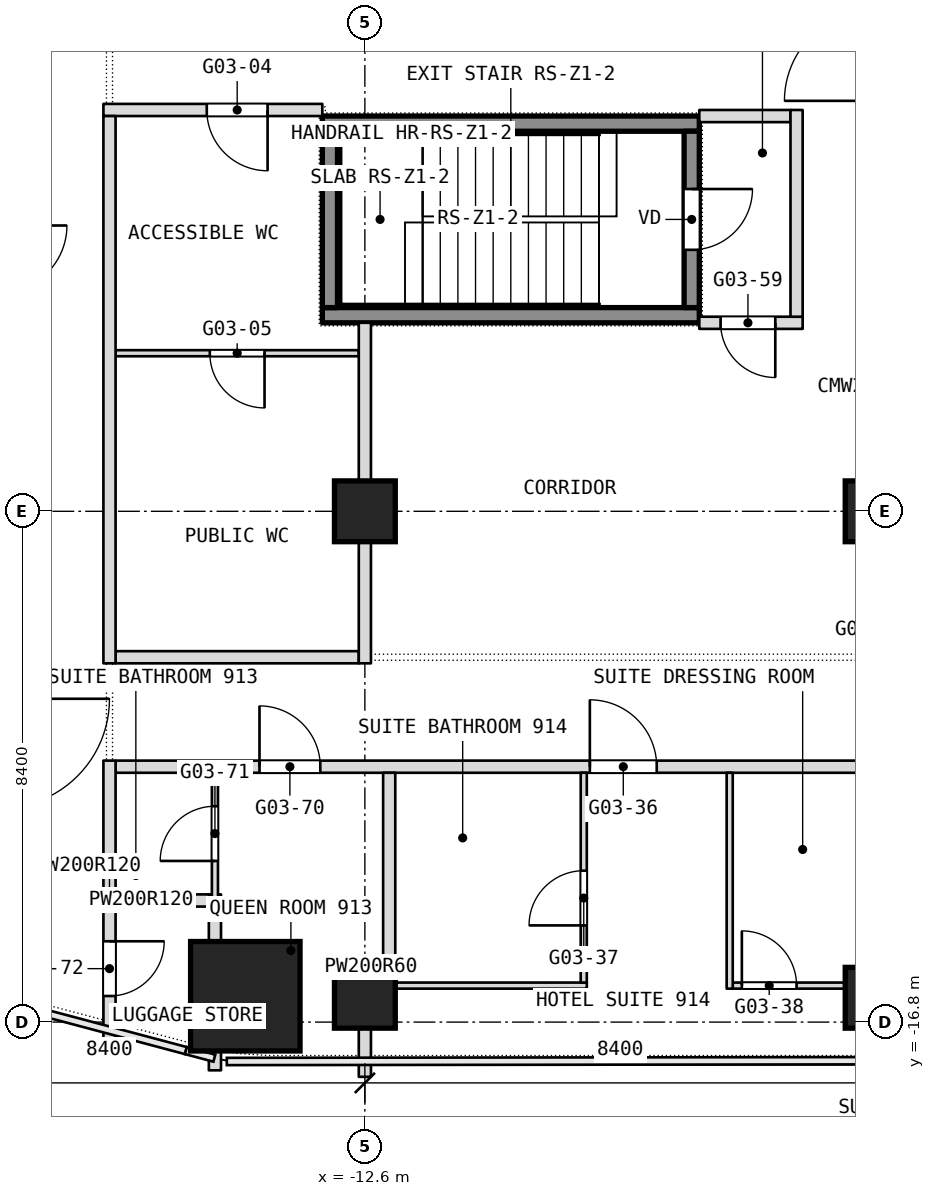
"""IFC4 building model, lengths in metres.
Left out: names, types, materials, properties, quantities, classifications, styles, units other than length and angle.
Written with IfcOpenShell. Run it as: python <this file> out.ifc"""

import sys

from ifc_helpers import new_model, si_unit, direction, frame, frame_2d, origin, origin_2d, place, context, subcontext, project, spatial, rectangle, extrude, element, fill, save


model = new_model("IFC4")
c1 = context("Model", 3, precision=1e-05, world=origin(), true_north=direction((0.0, 1.0)))
c2 = subcontext(c1, "Body", "Model", "MODEL_VIEW")
j1 = project(units=[si_unit("LENGTHUNIT", "METRE"), si_unit("PLANEANGLEUNIT", "RADIAN")], contexts=[c1])
p1 = place(None, origin())
s1 = spatial("IfcSite", under=j1, at=p1, CompositionType="ELEMENT")
p2 = place(p1, origin())
s2 = spatial("IfcBuilding", under=s1, at=p2, CompositionType="ELEMENT")
p3 = place(p2, frame((0.0, 0.0, 47.3)))
s3 = spatial("IfcBuildingStorey", under=s2, at=p3, CompositionType="ELEMENT", Elevation=47.3)
p4 = place(p3, frame((-14.566, -16.375, 0.0), z_axis=(0.0, 0.0, 1.0), x_axis=(1.0, 0.0, 0.0)))
e1 = element("IfcColumn", 1, at=p4, inside=s3, PredefinedType="COLUMN", context=c2, shape_type="SweptSolid", body=[
    extrude(rectangle(XDim=1.8, YDim=1.8, at=origin_2d()), origin(), (0.0, 0.0, 1.0), 3.6),
])
for number, where, z_axis, x_axis in (
    (2, (-12.6, -8.4, 0.0), (0.0, 0.0, 1.0), (1.0, 0.0, 0.0)),
    (3, (-4.2, -8.4, 0.0), (0.0, 0.0, 1.0), (1.0, 0.0, 0.0)),
    (4, (-4.2, -16.4, 0.0), (0.0, 0.0, 1.0), (1.0, 0.0, 0.0)),
    (5, (-12.6, -16.4, 0.0), (0.0, 0.0, 1.0), (1.0, 0.0, 0.0)),
):
    element("IfcColumn", number, at=place(p3, frame(where, z_axis=z_axis, x_axis=x_axis)), inside=s3, PredefinedType="COLUMN", context=c2, shape_type="SweptSolid", body=[
        extrude(rectangle(XDim=1.0, YDim=1.0, at=origin_2d()), origin(), (0.0, 0.0, 1.0), 3.6),
    ])
p5 = place(p3, frame((-12.5, -16.2, 0.0), z_axis=(0.0, 0.0, 1.0), x_axis=(1.0, 0.0, 0.0)))
e6 = element("IfcWall", 6, at=p5, inside=s3, PredefinedType="PARTITIONING", context=c2, shape_type="SweptSolid", body=[
    extrude(rectangle(XDim=3.55, YDim=0.1, at=frame_2d((1.775, 0.0))), origin(), (0.0, 0.0, 1.0), 2.94),
])
p6 = place(p3, frame((-6.55, -16.2, 0.0), z_axis=(0.0, 0.0, 1.0), x_axis=(1.0, 0.0, 0.0)))
e7 = element("IfcWall", 7, at=p6, inside=s3, PredefinedType="PARTITIONING", context=c2, shape_type="SweptSolid", body=[
    extrude(rectangle(XDim=4.8, YDim=0.1, at=frame_2d((2.4, 0.0))), origin(), (0.0, 0.0, 1.0), 2.94),
])
p7 = place(p6, frame((0.15, 0.0, 0.0)))
e8 = element("IfcOpeningElement", 8, at=p7, cuts=e7, PredefinedType="OPENING", context=c2, shape_type="SweptSolid", body=[
    extrude(rectangle(XDim=0.9, YDim=2.1, at=frame_2d((0.45, 1.05))), frame((0.0, 0.05, 0.0), z_axis=(0.0, -1.0, 0.0), x_axis=(1.0, 0.0, 0.0)), (0.0, 0.0, 1.0), 0.1),
])
p8 = place(p6, frame((3.75, 0.0, 0.0)))
e9 = element("IfcOpeningElement", 9, at=p8, cuts=e7, PredefinedType="OPENING", context=c2, shape_type="SweptSolid", body=[
    extrude(rectangle(XDim=0.9, YDim=2.1, at=frame_2d((0.45, 1.05))), frame((0.0, 0.05, 0.0), z_axis=(0.0, -1.0, 0.0), x_axis=(1.0, 0.0, 0.0)), (0.0, 0.0, 1.0), 0.1),
])
p9 = place(p3, frame((-12.7, -15.9, 0.0), z_axis=(0.0, 0.0, 1.0), x_axis=(1.0, 0.0, 0.0)))
e10 = element("IfcWall", 10, at=p9, inside=s3, PredefinedType="PARTITIONING", context=c2, shape_type="SweptSolid", body=[
    extrude(rectangle(XDim=0.4, YDim=0.2, at=frame_2d((0.2, 0.0))), origin(), (0.0, 0.0, 1.0), 3.34),
])
p10 = place(p3, frame((-16.7, -14.8, 0.0), z_axis=(0.0, 0.0, 1.0), x_axis=(1.0, 0.0, 0.0)))
e11 = element("IfcWall", 11, at=p10, inside=s3, PredefinedType="PARTITIONING", context=c2, shape_type="SweptSolid", body=[
    extrude(rectangle(XDim=1.584, YDim=0.2, at=frame_2d((0.792, 0.0))), origin(), (0.0, 0.0, 1.0), 3.34),
])
p11 = place(p3, frame((-16.7, -12.6, 0.0), z_axis=(0.0, 0.0, 1.0), x_axis=(1.0, 0.0, 0.0)))
e12 = element("IfcWall", 12, at=p11, inside=s3, PredefinedType="PARTITIONING", context=c2, shape_type="SweptSolid", body=[
    extrude(rectangle(XDim=33.4, YDim=0.2, at=frame_2d((16.7, 0.0))), origin(), (0.0, 0.0, 1.0), 3.34),
])
p12 = place(p11, frame((7.8, 0.0, 0.0)))
e13 = element("IfcOpeningElement", 13, at=p12, cuts=e12, PredefinedType="OPENING", context=c2, shape_type="SweptSolid", body=[
    extrude(rectangle(XDim=1.1, YDim=2.1, at=frame_2d((0.55, 1.05))), frame((0.0, 0.1, 0.0), z_axis=(0.0, -1.0, 0.0), x_axis=(1.0, 0.0, 0.0)), (0.0, 0.0, 1.0), 0.2),
])
p13 = place(p11, frame((16.1, 0.0, 0.0)))
e14 = element("IfcOpeningElement", 14, at=p13, cuts=e12, PredefinedType="OPENING", context=c2, shape_type="SweptSolid", body=[
    extrude(rectangle(XDim=1.1, YDim=2.1, at=frame_2d((0.55, 1.05))), frame((0.0, 0.1, 0.0), z_axis=(0.0, -1.0, 0.0), x_axis=(1.0, 0.0, 0.0)), (0.0, 0.0, 1.0), 0.2),
])
p14 = place(p11, frame((24.6, 0.0, 0.0)))
e15 = element("IfcOpeningElement", 15, at=p14, cuts=e12, PredefinedType="OPENING", context=c2, shape_type="SweptSolid", body=[
    extrude(rectangle(XDim=1.1, YDim=2.1, at=frame_2d((0.55, 1.05))), frame((0.0, 0.1, 0.0), z_axis=(0.0, -1.0, 0.0), x_axis=(1.0, 0.0, 0.0)), (0.0, 0.0, 1.0), 0.2),
])
p15 = place(p11, frame((2.367, 0.0, 0.0)))
e16 = element("IfcOpeningElement", 16, at=p15, cuts=e12, PredefinedType="OPENING", context=c2, shape_type="SweptSolid", body=[
    extrude(rectangle(XDim=1.0, YDim=2.1, at=frame_2d((0.5, 1.05))), frame((0.0, 0.1, 0.0), z_axis=(0.0, -1.0, 0.0), x_axis=(1.0, 0.0, 0.0)), (0.0, 0.0, 1.0), 0.2),
])
p16 = place(p11, frame((30.033, 0.0, 0.0)))
e17 = element("IfcOpeningElement", 17, at=p16, cuts=e12, PredefinedType="OPENING", context=c2, shape_type="SweptSolid", body=[
    extrude(rectangle(XDim=1.0, YDim=2.1, at=frame_2d((0.5, 1.05))), frame((0.0, 0.1, 0.0), z_axis=(0.0, -1.0, 0.0), x_axis=(1.0, 0.0, 0.0)), (0.0, 0.0, 1.0), 0.2),
])
p17 = place(p3, frame((-16.7, -10.8, 0.0), z_axis=(0.0, 0.0, 1.0), x_axis=(1.0, 0.0, 0.0)))
e18 = element("IfcWall", 18, at=p17, inside=s3, PredefinedType="PARTITIONING", context=c2, shape_type="SweptSolid", body=[
    extrude(rectangle(XDim=4.0, YDim=0.2, at=frame_2d((2.0, 0.0))), origin(), (0.0, 0.0, 1.0), 3.34),
])
p18 = place(p3, frame((-16.7, -5.8, 0.0), z_axis=(0.0, 0.0, 1.0), x_axis=(1.0, 0.0, 0.0)))
e19 = element("IfcWall", 19, at=p18, inside=s3, PredefinedType="PARTITIONING", context=c2, shape_type="SweptSolid", body=[
    extrude(rectangle(XDim=4.0, YDim=0.1, at=frame_2d((2.0, 0.0))), origin(), (0.0, 0.0, 1.0), 3.34),
])
p19 = place(p18, frame((1.55, 0.0, 0.0)))
e20 = element("IfcOpeningElement", 20, at=p19, cuts=e19, PredefinedType="OPENING", context=c2, shape_type="SweptSolid", body=[
    extrude(rectangle(XDim=0.9, YDim=2.1, at=frame_2d((0.45, 1.05))), frame((0.0, 0.05, 0.0), z_axis=(0.0, -1.0, 0.0), x_axis=(1.0, 0.0, 0.0)), (0.0, 0.0, 1.0), 0.1),
])
p20 = place(p3, frame((-7.1, -5.3, 0.0), z_axis=(0.0, 0.0, 1.0), x_axis=(1.0, 0.0, 0.0)))
e21 = element("IfcWall", 21, at=p20, inside=s3, PredefinedType="PARTITIONING", context=c2, shape_type="SweptSolid", body=[
    extrude(rectangle(XDim=1.7, YDim=0.2, at=frame_2d((0.85, 0.0))), origin(), (0.0, 0.0, 1.0), 3.34),
])
p21 = place(p20, frame((0.35, 0.0, 0.0)))
e22 = element("IfcOpeningElement", 22, at=p21, cuts=e21, PredefinedType="OPENING", context=c2, shape_type="SweptSolid", body=[
    extrude(rectangle(XDim=0.9, YDim=2.1, at=frame_2d((0.45, 1.05))), frame((0.0, 0.1, 0.0), z_axis=(0.0, -1.0, 0.0), x_axis=(1.0, 0.0, 0.0)), (0.0, 0.0, 1.0), 0.2),
])
p22 = place(p3, frame((-7.1, -1.9, 0.0), z_axis=(0.0, 0.0, 1.0), x_axis=(1.0, 0.0, 0.0)))
e23 = element("IfcWall", 23, at=p22, inside=s3, PredefinedType="PARTITIONING", context=c2, shape_type="SweptSolid", body=[
    extrude(rectangle(XDim=1.5, YDim=0.2, at=frame_2d((0.75, 0.0))), origin(), (0.0, 0.0, 1.0), 3.34),
])
p23 = place(p3, frame((-16.9, -1.8, 0.0), z_axis=(0.0, 0.0, 1.0), x_axis=(1.0, 0.0, 0.0)))
e24 = element("IfcWall", 24, at=p23, inside=s3, PredefinedType="PARTITIONING", context=c2, shape_type="SweptSolid", body=[
    extrude(rectangle(XDim=3.6, YDim=0.2, at=frame_2d((1.8, 0.0))), origin(), (0.0, 0.0, 1.0), 3.34),
])
p24 = place(p23, frame((1.7, 0.0, 0.0)))
e25 = element("IfcOpeningElement", 25, at=p24, cuts=e24, PredefinedType="OPENING", context=c2, shape_type="SweptSolid", body=[
    extrude(rectangle(XDim=1.0, YDim=2.1, at=frame_2d((0.5, 1.05))), frame((0.0, 0.1, 0.0), z_axis=(0.0, -1.0, 0.0), x_axis=(1.0, 0.0, 0.0)), (0.0, 0.0, 1.0), 0.2),
])
p25 = place(p3, frame((-5.5, -5.2, 0.0), z_axis=(0.0, 0.0, 1.0), x_axis=(0.0, 1.0, 0.0)))
e26 = element("IfcWall", 26, at=p25, inside=s3, PredefinedType="PARTITIONING", context=c2, shape_type="SweptSolid", body=[
    extrude(rectangle(XDim=3.4, YDim=0.2, at=frame_2d((1.7, 0.0))), origin(), (0.0, 0.0, 1.0), 3.34),
])
p26 = place(p3, frame((-6.6, -16.25, 0.0), z_axis=(0.0, 0.0, 1.0), x_axis=(0.0, 1.0, 0.0)))
e27 = element("IfcWall", 27, at=p26, inside=s3, PredefinedType="PARTITIONING", context=c2, shape_type="SweptSolid", body=[
    extrude(rectangle(XDim=3.55, YDim=0.1, at=frame_2d((1.775, 0.0))), origin(), (0.0, 0.0, 1.0), 3.34),
])
p27 = place(p3, frame((-9.0, -16.15, 0.0), z_axis=(0.0, 0.0, 1.0), x_axis=(0.0, 1.0, 0.0)))
e28 = element("IfcWall", 28, at=p27, inside=s3, PredefinedType="PARTITIONING", context=c2, shape_type="SweptSolid", body=[
    extrude(rectangle(XDim=3.45, YDim=0.1, at=frame_2d((1.725, 0.0))), origin(), (0.0, 0.0, 1.0), 3.34),
])
p28 = place(p27, frame((0.94, 0.0, 0.0)))
e29 = element("IfcOpeningElement", 29, at=p28, cuts=e28, PredefinedType="OPENING", context=c2, shape_type="SweptSolid", body=[
    extrude(rectangle(XDim=0.9, YDim=2.1, at=frame_2d((0.45, 1.05))), frame((0.0, 0.05, 0.0), z_axis=(0.0, -1.0, 0.0), x_axis=(1.0, 0.0, 0.0)), (0.0, 0.0, 1.0), 0.1),
])
p29 = place(p3, frame((-12.2, -16.0, 0.0), z_axis=(0.0, 0.0, 1.0), x_axis=(0.0, 1.0, 0.0)))
e30 = element("IfcWall", 30, at=p29, inside=s3, PredefinedType="PARTITIONING", context=c2, shape_type="SweptSolid", body=[
    extrude(rectangle(XDim=3.3, YDim=0.2, at=frame_2d((1.65, 0.0))), origin(), (0.0, 0.0, 1.0), 3.34),
])
p30 = place(p3, frame((-12.6, -17.7, 0.0), z_axis=(0.0, 0.0, 1.0), x_axis=(0.0, 1.0, 0.0)))
e31 = element("IfcWall", 31, at=p30, inside=s3, PredefinedType="PARTITIONING", context=c2, shape_type="SweptSolid", body=[
    extrude(rectangle(XDim=1.7, YDim=0.2, at=frame_2d((0.85, 0.0))), origin(), (0.0, 0.0, 1.0), 3.34),
])
p31 = place(p3, frame((-12.6, -10.9, 0.0), z_axis=(0.0, 0.0, 1.0), x_axis=(0.0, 1.0, 0.0)))
e32 = element("IfcWall", 32, at=p31, inside=s3, PredefinedType="PARTITIONING", context=c2, shape_type="SweptSolid", body=[
    extrude(rectangle(XDim=5.6, YDim=0.2, at=frame_2d((2.8, 0.0))), origin(), (0.0, 0.0, 1.0), 3.34),
])
p32 = place(p3, frame((-15.066, -17.593, 0.0), z_axis=(0.0, 0.0, 1.0), x_axis=(0.0, 1.0, 0.0)))
e33 = element("IfcWall", 33, at=p32, inside=s3, PredefinedType="PARTITIONING", context=c2, shape_type="SweptSolid", body=[
    extrude(rectangle(XDim=0.318, YDim=0.2, at=frame_2d((0.159, 0.0))), origin(), (0.0, 0.0, 1.0), 3.34),
])
p33 = place(p3, frame((-15.066, -15.475, 0.0), z_axis=(0.0, 0.0, 1.0), x_axis=(0.0, 1.0, 0.0)))
e34 = element("IfcWall", 34, at=p33, inside=s3, PredefinedType="PARTITIONING", context=c2, shape_type="SweptSolid", body=[
    extrude(rectangle(XDim=0.775, YDim=0.2, at=frame_2d((0.388, 0.0))), origin(), (0.0, 0.0, 1.0), 3.34),
])
p34 = place(p3, frame((-15.066, -14.9, 0.0), z_axis=(0.0, 0.0, 1.0), x_axis=(0.0, 1.0, 0.0)))
e35 = element("IfcWall", 35, at=p34, inside=s3, PredefinedType="PARTITIONING", context=c2, shape_type="SweptSolid", body=[
    extrude(rectangle(XDim=2.2, YDim=0.1, at=frame_2d((1.1, 0.0))), origin(), (0.0, 0.0, 1.0), 3.34),
])
p35 = place(p34, frame((0.75, 0.0, 0.0)))
e36 = element("IfcOpeningElement", 36, at=p35, cuts=e35, PredefinedType="OPENING", context=c2, shape_type="SweptSolid", body=[
    extrude(rectangle(XDim=0.9, YDim=2.1, at=frame_2d((0.45, 1.05))), frame((0.0, 0.05, 0.0), z_axis=(0.0, -1.0, 0.0), x_axis=(1.0, 0.0, 0.0)), (0.0, 0.0, 1.0), 0.1),
])
p36 = place(p3, frame((-16.8, -17.143, 0.0), z_axis=(0.0, 0.0, 1.0), x_axis=(0.0, 1.0, 0.0)))
e37 = element("IfcWall", 37, at=p36, inside=s3, PredefinedType="PARTITIONING", context=c2, shape_type="SweptSolid", body=[
    extrude(rectangle(XDim=4.643, YDim=0.2, at=frame_2d((2.322, 0.0))), origin(), (0.0, 0.0, 1.0), 3.34),
])
p37 = place(p36, frame((0.772, 0.0, 0.0)))
e38 = element("IfcOpeningElement", 38, at=p37, cuts=e37, PredefinedType="OPENING", context=c2, shape_type="SweptSolid", body=[
    extrude(rectangle(XDim=0.9, YDim=2.1, at=frame_2d((0.45, 1.05))), frame((0.0, 0.1, 0.0), z_axis=(0.0, -1.0, 0.0), x_axis=(1.0, 0.0, 0.0)), (0.0, 0.0, 1.0), 0.2),
])
p38 = place(p3, frame((-16.8, -10.9, 0.0), z_axis=(0.0, 0.0, 1.0), x_axis=(0.0, 1.0, 0.0)))
e39 = element("IfcWall", 39, at=p38, inside=s3, PredefinedType="PARTITIONING", context=c2, shape_type="SweptSolid", body=[
    extrude(rectangle(XDim=9.0, YDim=0.2, at=frame_2d((4.5, 0.0))), origin(), (0.0, 0.0, 1.0), 3.34),
])
for number, where, z_axis, x_axis in (
    (40, (-13.3, -5.175, 0.1), (0.0, 0.0, 1.0), (1.0, 0.0, 0.0)),
    (41, (-13.3, -2.025, 0.1), (0.0, 0.0, 1.0), (1.0, 0.0, 0.0)),
):
    element("IfcWall", number, at=place(p3, frame(where, z_axis=z_axis, x_axis=x_axis)), inside=s3, PredefinedType="SHEAR", context=c2, shape_type="SweptSolid", body=[
        extrude(rectangle(XDim=6.2, YDim=0.25, at=frame_2d((3.1, 0.0))), origin(), (0.0, 0.0, 1.0), 3.6),
    ])
p39 = place(p3, frame((-13.175, -5.05, 0.1), z_axis=(0.0, 0.0, 1.0), x_axis=(0.0, 1.0, 0.0)))
e42 = element("IfcWall", 42, at=p39, inside=s3, PredefinedType="SHEAR", context=c2, shape_type="SweptSolid", body=[
    extrude(rectangle(XDim=2.9, YDim=0.25, at=frame_2d((1.45, 0.0))), origin(), (0.0, 0.0, 1.0), 3.6),
])
p40 = place(p3, frame((-7.225, -5.05, 0.1), z_axis=(0.0, 0.0, 1.0), x_axis=(0.0, 1.0, 0.0)))
e43 = element("IfcWall", 43, at=p40, inside=s3, PredefinedType="SHEAR", context=c2, shape_type="SweptSolid", body=[
    extrude(rectangle(XDim=2.9, YDim=0.25, at=frame_2d((1.45, 0.0))), origin(), (0.0, 0.0, 1.0), 3.6),
])
p41 = place(p40, frame((0.95, 0.0, 0.0)))
e44 = element("IfcOpeningElement", 44, at=p41, cuts=e43, PredefinedType="OPENING", context=c2, shape_type="SweptSolid", body=[
    extrude(rectangle(XDim=1.0, YDim=2.1, at=frame_2d((0.5, 1.05))), frame((0.0, 0.125, 0.0), z_axis=(0.0, -1.0, 0.0), x_axis=(1.0, 0.0, 0.0)), (0.0, 0.0, 1.0), 0.25),
])
p42 = place(p7, origin())
e45 = element("IfcDoor", 45, at=p42, inside=s3, OperationType="SINGLE_SWING_LEFT", PredefinedType="DOOR", context=c2, shape_type="SweptSolid", body=[
    extrude(rectangle(XDim=0.9, YDim=2.1, at=frame_2d((0.45, 1.05))), frame((0.0, 0.025, 0.0), z_axis=(0.0, -1.0, 0.0), x_axis=(1.0, 0.0, 0.0)), (0.0, 0.0, 1.0), 0.05),
])
fill(e8, e45)
p43 = place(p12, origin())
e46 = element("IfcDoor", 46, at=p43, inside=s3, OperationType="SINGLE_SWING_RIGHT", PredefinedType="DOOR", context=c2, shape_type="SweptSolid", body=[
    extrude(rectangle(XDim=1.1, YDim=2.1, at=frame_2d((0.55, 1.05))), frame((0.0, 0.025, 0.0), z_axis=(0.0, -1.0, 0.0), x_axis=(1.0, 0.0, 0.0)), (0.0, 0.0, 1.0), 0.05),
])
fill(e13, e46)
p44 = place(p15, origin())
e47 = element("IfcDoor", 47, at=p44, inside=s3, OperationType="SINGLE_SWING_RIGHT", PredefinedType="DOOR", context=c2, shape_type="SweptSolid", body=[
    extrude(rectangle(XDim=1.0, YDim=2.1, at=frame_2d((0.5, 1.05))), frame((0.0, 0.025, 0.0), z_axis=(0.0, -1.0, 0.0), x_axis=(1.0, 0.0, 0.0)), (0.0, 0.0, 1.0), 0.05),
])
fill(e16, e47)
p45 = place(p19, origin())
e48 = element("IfcDoor", 48, at=p45, inside=s3, OperationType="SINGLE_SWING_LEFT", PredefinedType="DOOR", context=c2, shape_type="SweptSolid", body=[
    extrude(rectangle(XDim=0.9, YDim=2.1, at=frame_2d((0.45, 1.05))), frame((0.0, 0.025, 0.0), z_axis=(0.0, -1.0, 0.0), x_axis=(1.0, 0.0, 0.0)), (0.0, 0.0, 1.0), 0.05),
])
fill(e20, e48)
p46 = place(p21, origin())
e49 = element("IfcDoor", 49, at=p46, inside=s3, OperationType="SINGLE_SWING_RIGHT", PredefinedType="DOOR", context=c2, shape_type="SweptSolid", body=[
    extrude(rectangle(XDim=0.9, YDim=2.1, at=frame_2d((0.45, 1.05))), frame((0.0, 0.025, 0.0), z_axis=(0.0, -1.0, 0.0), x_axis=(1.0, 0.0, 0.0)), (0.0, 0.0, 1.0), 0.05),
])
fill(e22, e49)
p47 = place(p24, origin())
e50 = element("IfcDoor", 50, at=p47, inside=s3, OperationType="SINGLE_SWING_RIGHT", PredefinedType="DOOR", context=c2, shape_type="SweptSolid", body=[
    extrude(rectangle(XDim=1.0, YDim=2.1, at=frame_2d((0.5, 1.05))), frame((0.0, 0.025, 0.0), z_axis=(0.0, -1.0, 0.0), x_axis=(1.0, 0.0, 0.0)), (0.0, 0.0, 1.0), 0.05),
])
fill(e25, e50)
p48 = place(p28, origin())
e51 = element("IfcDoor", 51, at=p48, inside=s3, OperationType="SINGLE_SWING_LEFT", PredefinedType="DOOR", context=c2, shape_type="SweptSolid", body=[
    extrude(rectangle(XDim=0.9, YDim=2.1, at=frame_2d((0.45, 1.05))), frame((0.0, 0.025, 0.0), z_axis=(0.0, -1.0, 0.0), x_axis=(1.0, 0.0, 0.0)), (0.0, 0.0, 1.0), 0.05),
])
fill(e29, e51)
p49 = place(p35, origin())
e52 = element("IfcDoor", 52, at=p49, inside=s3, OperationType="SINGLE_SWING_RIGHT", PredefinedType="DOOR", context=c2, shape_type="SweptSolid", body=[
    extrude(rectangle(XDim=0.9, YDim=2.1, at=frame_2d((0.45, 1.05))), frame((0.0, 0.025, 0.0), z_axis=(0.0, -1.0, 0.0), x_axis=(1.0, 0.0, 0.0)), (0.0, 0.0, 1.0), 0.05),
])
fill(e36, e52)
p50 = place(p37, origin())
e53 = element("IfcDoor", 53, at=p50, inside=s3, OperationType="SINGLE_SWING_LEFT", PredefinedType="DOOR", context=c2, shape_type="SweptSolid", body=[
    extrude(rectangle(XDim=0.9, YDim=2.1, at=frame_2d((0.45, 1.05))), frame((0.0, 0.025, 0.0), z_axis=(0.0, -1.0, 0.0), x_axis=(1.0, 0.0, 0.0)), (0.0, 0.0, 1.0), 0.05),
])
fill(e38, e53)
p51 = place(p41, origin())
e54 = element("IfcDoor", 54, at=p51, inside=s3, OperationType="SINGLE_SWING_LEFT", PredefinedType="DOOR", context=c2, shape_type="SweptSolid", body=[
    extrude(rectangle(XDim=1.0, YDim=2.1, at=frame_2d((0.5, 1.05))), frame((0.0, 0.025, 0.0), z_axis=(0.0, -1.0, 0.0), x_axis=(1.0, 0.0, 0.0)), (0.0, 0.0, 1.0), 0.05),
])
fill(e44, e54)
save(model, sys.argv[1])
